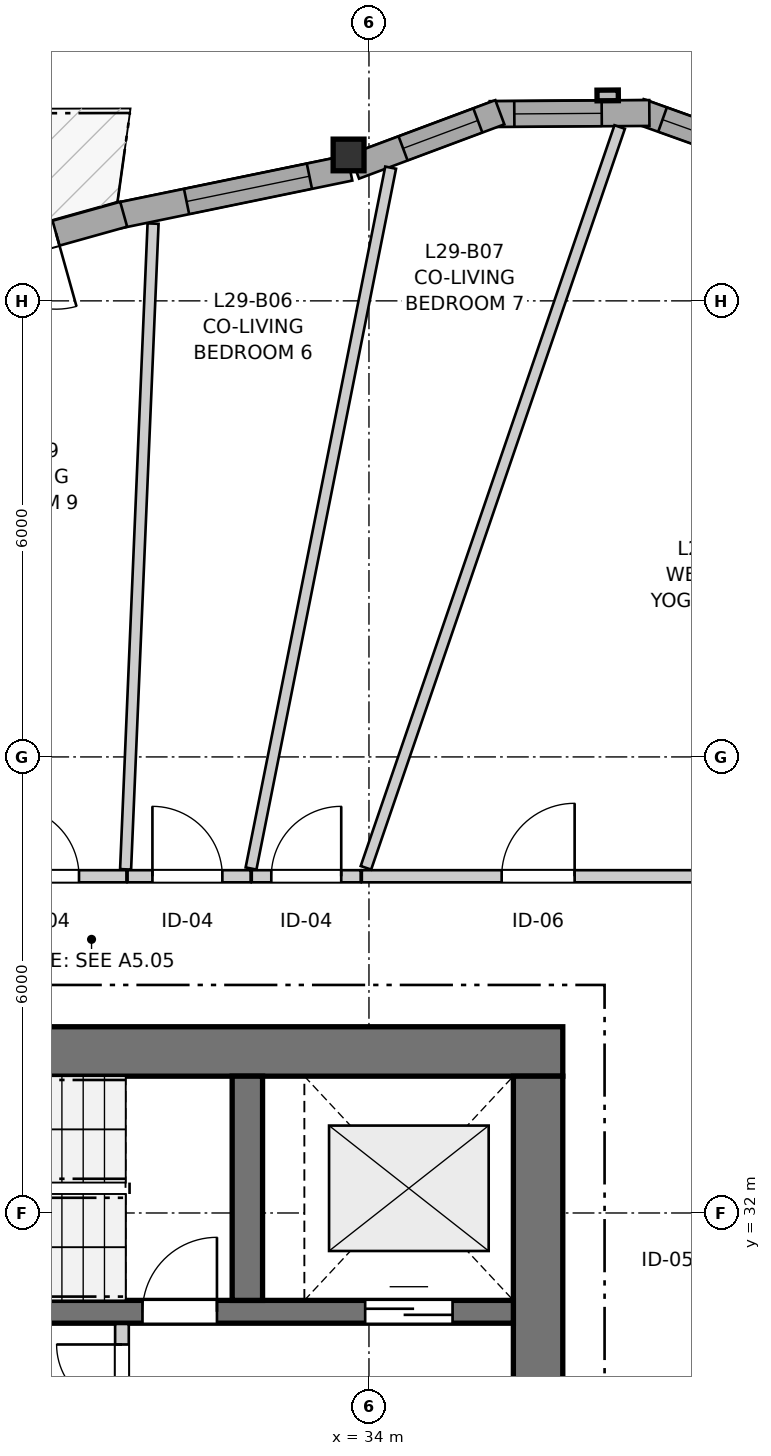
"""IFC4 building model, lengths in metres.
Left out: names, types, materials, properties, quantities, classifications, styles, units other than length and angle.
Written with IfcOpenShell. Run it as: python <this file> out.ifc"""

import sys

from ifc_helpers import new_model, si_unit, direction, frame, frame_2d, origin, origin_2d, place, context, subcontext, project, spatial, rectangle, i_section, extrude, source, transform, mapped, element, fill, save


model = new_model("IFC4")
c1 = context("Model", 3, precision=1e-05, world=origin(), true_north=direction((0.0, 1.0)))
c2 = subcontext(c1, "Body", "Model", "MODEL_VIEW")
j1 = project(units=[si_unit("LENGTHUNIT", "METRE"), si_unit("PLANEANGLEUNIT", "RADIAN")], contexts=[c1])
p1 = place(None, origin())
s1 = spatial("IfcSite", under=j1, at=p1, CompositionType="ELEMENT")
p2 = place(p1, origin())
s2 = spatial("IfcBuilding", under=s1, at=p2, CompositionType="ELEMENT")
p3 = place(p2, frame((0.0, 0.0, 99.2)))
s3 = spatial("IfcBuildingStorey", under=s2, at=p3, CompositionType="ELEMENT", Elevation=99.2)
p4 = place(p3, frame((36.55, 34.125, 0.0), z_axis=(0.0, 0.0, 1.0), x_axis=(-1.0, 0.0, 0.0)))
e1 = element("IfcWall", 1, at=p4, inside=s3, PredefinedType="SHEAR", context=c2, shape_type="SweptSolid", body=[
    extrude(rectangle(XDim=12.4, YDim=0.65, at=frame_2d((6.2, 0.0))), origin(), (0.0, 0.0, 1.0), 2.95),
])
p5 = place(p3, frame((36.225, 18.2, 0.0), z_axis=(0.0, 0.0, 1.0), x_axis=(0.0, 1.0, 0.0)))
e2 = element("IfcWall", 2, at=p5, inside=s3, PredefinedType="SHEAR", context=c2, shape_type="SweptSolid", body=[
    extrude(rectangle(XDim=15.6, YDim=0.65, at=frame_2d((7.8, 0.0))), origin(), (0.0, 0.0, 1.0), 2.95),
])
p6 = place(p5, frame((4.25, 0.0, 0.0)))
e3 = element("IfcOpeningElement", 3, at=p6, cuts=e2, PredefinedType="OPENING", context=c2, shape_type="SweptSolid", body=[
    extrude(rectangle(XDim=1.1, YDim=2.15, at=frame_2d((0.55, 1.075))), frame((0.0, 0.335, 0.0), z_axis=(0.0, -1.0, 0.0), x_axis=(1.0, 0.0, 0.0)), (0.0, 0.0, 1.0), 0.67),
])
p7 = place(p5, frame((10.25, 0.0, 0.0)))
e4 = element("IfcOpeningElement", 4, at=p7, cuts=e2, PredefinedType="OPENING", context=c2, shape_type="SweptSolid", body=[
    extrude(rectangle(XDim=1.1, YDim=2.15, at=frame_2d((0.55, 1.075))), frame((0.0, 0.335, 0.0), z_axis=(0.0, -1.0, 0.0), x_axis=(1.0, 0.0, 0.0)), (0.0, 0.0, 1.0), 0.67),
])
p8 = place(p3, frame((24.8, 30.7, 0.0), z_axis=(0.0, 0.0, 1.0), x_axis=(1.0, 0.0, 0.0)))
e5 = element("IfcWall", 5, at=p8, inside=s3, PredefinedType="SHEAR", context=c2, shape_type="SweptSolid", body=[
    extrude(rectangle(XDim=11.1, YDim=0.3, at=frame_2d((5.55, 0.0))), origin(), (0.0, 0.0, 1.0), 2.95),
])
p9 = place(p8, frame((6.22, 0.0, 0.0)))
e6 = element("IfcOpeningElement", 6, at=p9, cuts=e5, PredefinedType="OPENING", context=c2, shape_type="SweptSolid", body=[
    extrude(rectangle(XDim=0.98, YDim=2.15, at=frame_2d((0.49, 1.075))), frame((0.0, 0.16, 0.0), z_axis=(0.0, -1.0, 0.0), x_axis=(1.0, 0.0, 0.0)), (0.0, 0.0, 1.0), 0.32),
])
p10 = place(p8, frame((9.15, 0.0, 0.0)))
e7 = element("IfcOpeningElement", 7, at=p10, cuts=e5, PredefinedType="OPENING", context=c2, shape_type="SweptSolid", body=[
    extrude(rectangle(XDim=1.15, YDim=2.15, at=frame_2d((0.575, 1.075))), frame((0.0, 0.16, 0.0), z_axis=(0.0, -1.0, 0.0), x_axis=(1.0, 0.0, 0.0)), (0.0, 0.0, 1.0), 0.32),
])
p11 = place(p3, frame((32.4, 30.85, 0.0), z_axis=(0.0, 0.0, 1.0), x_axis=(0.0, 1.0, 0.0)))
e8 = element("IfcWall", 8, at=p11, inside=s3, PredefinedType="SHEAR", context=c2, shape_type="SweptSolid", body=[
    extrude(rectangle(XDim=2.95, YDim=0.4, at=frame_2d((1.475, 0.0))), origin(), (0.0, 0.0, 1.0), 2.95),
])
m1 = source(origin(), c2, "Body", "SweptSolid", [
    extrude(i_section(OverallWidth=0.406, OverallDepth=0.416, WebThickness=0.027, FlangeThickness=0.044, FilletRadius=0.015, at=origin_2d()), origin(), (0.0, 0.0, 1.0), 2.95),
])
p12 = place(p3, frame((33.732, 45.92, 0.0), z_axis=(0.0, 0.0, 1.0), x_axis=(1.0, 0.0, 0.0)))
e9 = element("IfcColumn", 9, at=p12, inside=s3, PredefinedType="PILASTER", context=c2, shape_type="MappedRepresentation", body=[
    mapped(m1, transform((0.0, 0.0, 0.0), x_axis=(1.0, 0.0, 0.0), y_axis=(0.0, 1.0, 0.0), z_axis=(0.0, 0.0, 1.0), scale=1.0)),
])
p13 = place(p3, frame((39.533, 45.787, 0.0), z_axis=(0.0, 0.0, 1.0), x_axis=(-0.941523304278, 0.336947870598, 0.0)))
e10 = element("IfcWall", 10, at=p13, inside=s3, PredefinedType="SOLIDWALL", context=c2, shape_type="SweptSolid", body=[
    extrude(rectangle(XDim=2.099, YDim=0.34, at=frame_2d((1.05, 0.0))), origin(), (0.0, 0.0, 1.0), 2.48),
])
p14 = place(p13, frame((0.324, 0.0, 0.82)))
e11 = element("IfcOpeningElement", 11, at=p14, cuts=e10, PredefinedType="OPENING", context=c2, shape_type="SweptSolid", body=[
    extrude(rectangle(XDim=1.45, YDim=1.25, at=frame_2d((0.725, 0.625))), frame((0.0, 0.18, 0.0), z_axis=(0.0, -1.0, 0.0), x_axis=(1.0, 0.0, 0.0)), (0.0, 0.0, 1.0), 0.36),
])
p15 = place(p3, frame((37.689, 46.471, 0.0), z_axis=(0.0, 0.0, 1.0), x_axis=(-0.999976456891, -0.00686189939, 0.0)))
e12 = element("IfcWall", 12, at=p15, inside=s3, PredefinedType="SOLIDWALL", context=c2, shape_type="SweptSolid", body=[
    extrude(rectangle(XDim=2.099, YDim=0.34, at=frame_2d((1.05, 0.0))), origin(), (0.0, 0.0, 1.0), 2.48),
])
p16 = place(p15, frame((0.627, 0.0, 0.82)))
e13 = element("IfcOpeningElement", 13, at=p16, cuts=e12, PredefinedType="OPENING", context=c2, shape_type="SweptSolid", body=[
    extrude(rectangle(XDim=1.15, YDim=1.2, at=frame_2d((0.575, 0.6))), frame((0.0, 0.18, 0.0), z_axis=(0.0, -1.0, 0.0), x_axis=(1.0, 0.0, 0.0)), (0.0, 0.0, 1.0), 0.36),
])
p17 = place(p3, frame((35.722, 46.481, 0.0), z_axis=(0.0, 0.0, 1.0), x_axis=(-0.9368002254, -0.349864741994, 0.0)))
e14 = element("IfcWall", 14, at=p17, inside=s3, PredefinedType="SOLIDWALL", context=c2, shape_type="SweptSolid", body=[
    extrude(rectangle(XDim=2.041, YDim=0.34, at=frame_2d((1.021, 0.0))), origin(), (0.0, 0.0, 1.0), 2.48),
])
p18 = place(p17, frame((0.309, 0.0, 0.82)))
e15 = element("IfcOpeningElement", 15, at=p18, cuts=e14, PredefinedType="OPENING", context=c2, shape_type="SweptSolid", body=[
    extrude(rectangle(XDim=1.05, YDim=1.45, at=frame_2d((0.525, 0.725))), frame((0.0, 0.18, 0.0), z_axis=(0.0, -1.0, 0.0), x_axis=(1.0, 0.0, 0.0)), (0.0, 0.0, 1.0), 0.36),
])
p19 = place(p3, frame((33.747, 45.749, 0.0), z_axis=(0.0, 0.0, 1.0), x_axis=(-0.979440240026, -0.201734519153, 0.0)))
e16 = element("IfcWall", 16, at=p19, inside=s3, PredefinedType="SOLIDWALL", context=c2, shape_type="SweptSolid", body=[
    extrude(rectangle(XDim=3.124, YDim=0.34, at=frame_2d((1.562, 0.0))), origin(), (0.0, 0.0, 1.0), 2.48),
])
p20 = place(p19, frame((0.541, 0.0, 0.82)))
e17 = element("IfcOpeningElement", 17, at=p20, cuts=e16, PredefinedType="OPENING", context=c2, shape_type="SweptSolid", body=[
    extrude(rectangle(XDim=1.65, YDim=1.45, at=frame_2d((0.825, 0.725))), frame((0.0, 0.18, 0.0), z_axis=(0.0, -1.0, 0.0), x_axis=(1.0, 0.0, 0.0)), (0.0, 0.0, 1.0), 0.36),
])
p21 = place(p3, frame((30.773, 45.139, 0.0), z_axis=(0.0, 0.0, 1.0), x_axis=(-0.963038749839, -0.269362889627, 0.0)))
e18 = element("IfcWall", 18, at=p21, inside=s3, PredefinedType="SOLIDWALL", context=c2, shape_type="SweptSolid", body=[
    extrude(rectangle(XDim=2.849, YDim=0.34, at=frame_2d((1.424, 0.0))), origin(), (0.0, 0.0, 1.0), 2.48),
])
p22 = place(p21, frame((0.924, 0.0, 0.0)))
e19 = element("IfcOpeningElement", 19, at=p22, cuts=e18, PredefinedType="OPENING", context=c2, shape_type="SweptSolid", body=[
    extrude(rectangle(XDim=1.0, YDim=2.1, at=frame_2d((0.5, 1.05))), frame((0.0, 0.18, 0.0), z_axis=(0.0, -1.0, 0.0), x_axis=(1.0, 0.0, 0.0)), (0.0, 0.0, 1.0), 0.36),
])
p23 = place(p3, frame((30.75, 27.43, 0.0), z_axis=(0.0, 0.0, 1.0), x_axis=(0.0, 1.0, 0.0)))
e20 = element("IfcWall", 20, at=p23, inside=s3, PredefinedType="PARTITIONING", context=c2, shape_type="SweptSolid", body=[
    extrude(rectangle(XDim=3.11, YDim=0.18, at=frame_2d((1.555, 0.0))), origin(), (0.0, 0.0, 1.0), 2.95),
])
p24 = place(p23, frame((1.98, 0.0, 0.0)))
e21 = element("IfcOpeningElement", 21, at=p24, cuts=e20, PredefinedType="OPENING", context=c2, shape_type="SweptSolid", body=[
    extrude(rectangle(XDim=0.86, YDim=2.05, at=frame_2d((0.43, 1.025))), frame((0.0, 0.1, 0.0), z_axis=(0.0, -1.0, 0.0), x_axis=(1.0, 0.0, 0.0)), (0.0, 0.0, 1.0), 0.2),
])
p25 = place(p3, frame((33.906, 36.43, 0.0), z_axis=(0.0, 0.0, 1.0), x_axis=(1.0, 0.0, 0.0)))
e22 = element("IfcWall", 22, at=p25, inside=s3, PredefinedType="PARTITIONING", context=c2, shape_type="SweptSolid", body=[
    extrude(rectangle(XDim=4.624, YDim=0.16, at=frame_2d((2.312, 0.0))), origin(), (0.0, 0.0, 1.0), 2.588),
])
p26 = place(p25, frame((1.84, 0.0, 0.0)))
e23 = element("IfcOpeningElement", 23, at=p26, cuts=e22, PredefinedType="OPENING", context=c2, shape_type="SweptSolid", body=[
    extrude(rectangle(XDim=0.96, YDim=2.1, at=frame_2d((0.48, 1.05))), frame((0.0, 0.09, 0.0), z_axis=(0.0, -1.0, 0.0), x_axis=(1.0, 0.0, 0.0)), (0.0, 0.0, 1.0), 0.18),
])
p27 = place(p3, frame((28.686, 36.43, 0.0), z_axis=(0.0, 0.0, 1.0), x_axis=(1.0, 0.0, 0.0)))
e24 = element("IfcWall", 24, at=p27, inside=s3, PredefinedType="PARTITIONING", context=c2, shape_type="SweptSolid", body=[
    extrude(rectangle(XDim=2.123, YDim=0.16, at=frame_2d((1.062, 0.0))), origin(), (0.0, 0.0, 1.0), 2.95),
])
p28 = place(p27, frame((0.579, 0.0, 0.0)))
e25 = element("IfcOpeningElement", 25, at=p28, cuts=e24, PredefinedType="OPENING", context=c2, shape_type="SweptSolid", body=[
    extrude(rectangle(XDim=0.92, YDim=2.1, at=frame_2d((0.46, 1.05))), frame((0.0, 0.09, 0.0), z_axis=(0.0, -1.0, 0.0), x_axis=(1.0, 0.0, 0.0)), (0.0, 0.0, 1.0), 0.18),
])
p29 = place(p3, frame((30.824, 36.43, 0.0), z_axis=(0.0, 0.0, 1.0), x_axis=(1.0, 0.0, 0.0)))
e26 = element("IfcWall", 26, at=p29, inside=s3, PredefinedType="PARTITIONING", context=c2, shape_type="SweptSolid", body=[
    extrude(rectangle(XDim=1.619, YDim=0.16, at=frame_2d((0.81, 0.0))), origin(), (0.0, 0.0, 1.0), 2.95),
])
p30 = place(p29, frame((0.327, 0.0, 0.0)))
e27 = element("IfcOpeningElement", 27, at=p30, cuts=e26, PredefinedType="OPENING", context=c2, shape_type="SweptSolid", body=[
    extrude(rectangle(XDim=0.92, YDim=2.1, at=frame_2d((0.46, 1.05))), frame((0.0, 0.09, 0.0), z_axis=(0.0, -1.0, 0.0), x_axis=(1.0, 0.0, 0.0)), (0.0, 0.0, 1.0), 0.18),
])
p31 = place(p3, frame((32.458, 36.43, 0.0), z_axis=(0.0, 0.0, 1.0), x_axis=(1.0, 0.0, 0.0)))
e28 = element("IfcWall", 28, at=p31, inside=s3, PredefinedType="PARTITIONING", context=c2, shape_type="SweptSolid", body=[
    extrude(rectangle(XDim=1.433, YDim=0.16, at=frame_2d((0.717, 0.0))), origin(), (0.0, 0.0, 1.0), 2.95),
])
p32 = place(p31, frame((0.257, 0.0, 0.0)))
e29 = element("IfcOpeningElement", 29, at=p32, cuts=e28, PredefinedType="OPENING", context=c2, shape_type="SweptSolid", body=[
    extrude(rectangle(XDim=0.92, YDim=2.1, at=frame_2d((0.46, 1.05))), frame((0.0, 0.09, 0.0), z_axis=(0.0, -1.0, 0.0), x_axis=(1.0, 0.0, 0.0)), (0.0, 0.0, 1.0), 0.18),
])
p33 = place(p3, frame((33.96, 36.541, 0.0), z_axis=(0.0, 0.0, 1.0), x_axis=(0.324058346196, 0.946037096662, 0.0)))
e30 = element("IfcWall", 30, at=p33, inside=s3, PredefinedType="PARTITIONING", context=c2, shape_type="SweptSolid", body=[
    extrude(rectangle(XDim=10.302, YDim=0.145, at=frame_2d((5.151, 0.0))), origin(), (0.0, 0.0, 1.0), 2.95),
])
p34 = place(p3, frame((32.448, 36.532, 0.0), z_axis=(0.0, 0.0, 1.0), x_axis=(0.195406965811, 0.980722242897, 0.0)))
e31 = element("IfcWall", 31, at=p34, inside=s3, PredefinedType="PARTITIONING", context=c2, shape_type="SweptSolid", body=[
    extrude(rectangle(XDim=9.402, YDim=0.145, at=frame_2d((4.701, 0.0))), origin(), (0.0, 0.0, 1.0), 2.95),
])
p35 = place(p3, frame((30.798, 36.521, 0.0), z_axis=(0.0, 0.0, 1.0), x_axis=(0.042521424142, 0.999095555234, 0.0)))
e32 = element("IfcWall", 32, at=p35, inside=s3, PredefinedType="PARTITIONING", context=c2, shape_type="SweptSolid", body=[
    extrude(rectangle(XDim=8.503, YDim=0.145, at=frame_2d((4.252, 0.0))), origin(), (0.0, 0.0, 1.0), 2.95),
])
m2 = source(origin(), c2, "Body", "SweptSolid", [
    extrude(rectangle(XDim=1.45, YDim=1.25, at=frame_2d((0.725, 0.625))), frame((0.0, 0.03, 0.0), z_axis=(0.0, -1.0, 0.0), x_axis=(1.0, 0.0, 0.0)), (0.0, 0.0, 1.0), 0.06),
])
p36 = place(p14, origin())
e33 = element("IfcWindow", 33, at=p36, inside=s3, PartitioningType="SINGLE_PANEL", PredefinedType="WINDOW", context=c2, shape_type="MappedRepresentation", body=[
    mapped(m2, transform((0.0, 0.0, 0.0), x_axis=(1.0, 0.0, 0.0), y_axis=(0.0, 1.0, 0.0), z_axis=(0.0, 0.0, 1.0), scale=1.0)),
])
fill(e11, e33)
m3 = source(origin(), c2, "Body", "SweptSolid", [
    extrude(rectangle(XDim=1.15, YDim=1.2, at=frame_2d((0.575, 0.6))), frame((0.0, 0.03, 0.0), z_axis=(0.0, -1.0, 0.0), x_axis=(1.0, 0.0, 0.0)), (0.0, 0.0, 1.0), 0.06),
])
p37 = place(p16, origin())
e34 = element("IfcWindow", 34, at=p37, inside=s3, PartitioningType="SINGLE_PANEL", PredefinedType="WINDOW", context=c2, shape_type="MappedRepresentation", body=[
    mapped(m3, transform((0.0, 0.0, 0.0), x_axis=(1.0, 0.0, 0.0), y_axis=(0.0, 1.0, 0.0), z_axis=(0.0, 0.0, 1.0), scale=1.0)),
])
fill(e13, e34)
m4 = source(origin(), c2, "Body", "SweptSolid", [
    extrude(rectangle(XDim=1.05, YDim=1.45, at=frame_2d((0.525, 0.725))), frame((0.0, 0.03, 0.0), z_axis=(0.0, -1.0, 0.0), x_axis=(1.0, 0.0, 0.0)), (0.0, 0.0, 1.0), 0.06),
])
p38 = place(p18, origin())
e35 = element("IfcWindow", 35, at=p38, inside=s3, PartitioningType="SINGLE_PANEL", PredefinedType="WINDOW", context=c2, shape_type="MappedRepresentation", body=[
    mapped(m4, transform((0.0, 0.0, 0.0), x_axis=(1.0, 0.0, 0.0), y_axis=(0.0, 1.0, 0.0), z_axis=(0.0, 0.0, 1.0), scale=1.0)),
])
fill(e15, e35)
m5 = source(origin(), c2, "Body", "SweptSolid", [
    extrude(rectangle(XDim=1.65, YDim=1.45, at=frame_2d((0.825, 0.725))), frame((0.0, 0.03, 0.0), z_axis=(0.0, -1.0, 0.0), x_axis=(1.0, 0.0, 0.0)), (0.0, 0.0, 1.0), 0.06),
])
p39 = place(p20, origin())
e36 = element("IfcWindow", 36, at=p39, inside=s3, PartitioningType="SINGLE_PANEL", PredefinedType="WINDOW", context=c2, shape_type="MappedRepresentation", body=[
    mapped(m5, transform((0.0, 0.0, 0.0), x_axis=(1.0, 0.0, 0.0), y_axis=(0.0, 1.0, 0.0), z_axis=(0.0, 0.0, 1.0), scale=1.0)),
])
fill(e17, e36)
m6 = source(origin(), c2, "Body", "SweptSolid", [
    extrude(rectangle(XDim=1.0, YDim=2.1, at=frame_2d((0.5, 1.05))), frame((0.0, 0.025, 0.0), z_axis=(0.0, -1.0, 0.0), x_axis=(1.0, 0.0, 0.0)), (0.0, 0.0, 1.0), 0.05),
])
p40 = place(p22, origin())
e37 = element("IfcDoor", 37, at=p40, inside=s3, OperationType="SINGLE_SWING_LEFT", PredefinedType="DOOR", context=c2, shape_type="MappedRepresentation", body=[
    mapped(m6, transform((0.0, 0.0, 0.0), x_axis=(1.0, 0.0, 0.0), y_axis=(0.0, 1.0, 0.0), z_axis=(0.0, 0.0, 1.0), scale=1.0)),
])
fill(e19, e37)
m7 = source(origin(), c2, "Body", "SweptSolid", [
    extrude(rectangle(XDim=0.98, YDim=2.15, at=frame_2d((0.49, 1.075))), frame((0.0, 0.025, 0.0), z_axis=(0.0, -1.0, 0.0), x_axis=(1.0, 0.0, 0.0)), (0.0, 0.0, 1.0), 0.05),
])
p41 = place(p9, origin())
e38 = element("IfcDoor", 38, at=p41, inside=s3, OperationType="SINGLE_SWING_RIGHT", PredefinedType="DOOR", context=c2, shape_type="MappedRepresentation", body=[
    mapped(m7, transform((0.0, 0.0, 0.0), x_axis=(1.0, 0.0, 0.0), y_axis=(0.0, 1.0, 0.0), z_axis=(0.0, 0.0, 1.0), scale=1.0)),
])
fill(e6, e38)
m8 = source(origin(), c2, "Body", "SweptSolid", [
    extrude(rectangle(XDim=1.15, YDim=2.15, at=frame_2d((0.575, 1.075))), frame((0.0, 0.025, 0.0), z_axis=(0.0, -1.0, 0.0), x_axis=(1.0, 0.0, 0.0)), (0.0, 0.0, 1.0), 0.05),
])
p42 = place(p10, origin())
e39 = element("IfcDoor", 39, at=p42, inside=s3, OperationType="DOUBLE_DOOR_SLIDING", PredefinedType="DOOR", context=c2, shape_type="MappedRepresentation", body=[
    mapped(m8, transform((0.0, 0.0, 0.0), x_axis=(1.0, 0.0, 0.0), y_axis=(0.0, 1.0, 0.0), z_axis=(0.0, 0.0, 1.0), scale=1.0)),
])
fill(e7, e39)
m9 = source(origin(), c2, "Body", "SweptSolid", [
    extrude(rectangle(XDim=0.86, YDim=2.05, at=frame_2d((0.43, 1.025))), frame((0.0, 0.025, 0.0), z_axis=(0.0, -1.0, 0.0), x_axis=(1.0, 0.0, 0.0)), (0.0, 0.0, 1.0), 0.05),
])
p43 = place(p24, origin())
e40 = element("IfcDoor", 40, at=p43, inside=s3, OperationType="SINGLE_SWING_RIGHT", PredefinedType="DOOR", context=c2, shape_type="MappedRepresentation", body=[
    mapped(m9, transform((0.0, 0.0, 0.0), x_axis=(1.0, 0.0, 0.0), y_axis=(0.0, 1.0, 0.0), z_axis=(0.0, 0.0, 1.0), scale=1.0)),
])
fill(e21, e40)
m10 = source(origin(), c2, "Body", "SweptSolid", [
    extrude(rectangle(XDim=0.96, YDim=2.1, at=frame_2d((0.48, 1.05))), frame((0.0, 0.025, 0.0), z_axis=(0.0, -1.0, 0.0), x_axis=(1.0, 0.0, 0.0)), (0.0, 0.0, 1.0), 0.05),
])
p44 = place(p26, origin())
e41 = element("IfcDoor", 41, at=p44, inside=s3, OperationType="SINGLE_SWING_RIGHT", PredefinedType="DOOR", context=c2, shape_type="MappedRepresentation", body=[
    mapped(m10, transform((0.0, 0.0, 0.0), x_axis=(1.0, 0.0, 0.0), y_axis=(0.0, 1.0, 0.0), z_axis=(0.0, 0.0, 1.0), scale=1.0)),
])
fill(e23, e41)
m11 = source(origin(), c2, "Body", "SweptSolid", [
    extrude(rectangle(XDim=0.92, YDim=2.1, at=frame_2d((0.46, 1.05))), frame((0.0, 0.025, 0.0), z_axis=(0.0, -1.0, 0.0), x_axis=(1.0, 0.0, 0.0)), (0.0, 0.0, 1.0), 0.05),
])
p45 = place(p28, origin())
e42 = element("IfcDoor", 42, at=p45, inside=s3, OperationType="SINGLE_SWING_LEFT", PredefinedType="DOOR", context=c2, shape_type="MappedRepresentation", body=[
    mapped(m11, transform((0.0, 0.0, 0.0), x_axis=(1.0, 0.0, 0.0), y_axis=(0.0, 1.0, 0.0), z_axis=(0.0, 0.0, 1.0), scale=1.0)),
])
fill(e25, e42)
p46 = place(p30, origin())
e43 = element("IfcDoor", 43, at=p46, inside=s3, OperationType="SINGLE_SWING_LEFT", PredefinedType="DOOR", context=c2, shape_type="MappedRepresentation", body=[
    mapped(m11, transform((0.0, 0.0, 0.0), x_axis=(1.0, 0.0, 0.0), y_axis=(0.0, 1.0, 0.0), z_axis=(0.0, 0.0, 1.0), scale=1.0)),
])
fill(e27, e43)
p47 = place(p32, origin())
e44 = element("IfcDoor", 44, at=p47, inside=s3, OperationType="SINGLE_SWING_RIGHT", PredefinedType="DOOR", context=c2, shape_type="MappedRepresentation", body=[
    mapped(m11, transform((0.0, 0.0, 0.0), x_axis=(1.0, 0.0, 0.0), y_axis=(0.0, 1.0, 0.0), z_axis=(0.0, 0.0, 1.0), scale=1.0)),
])
fill(e29, e44)
save(model, sys.argv[1])
